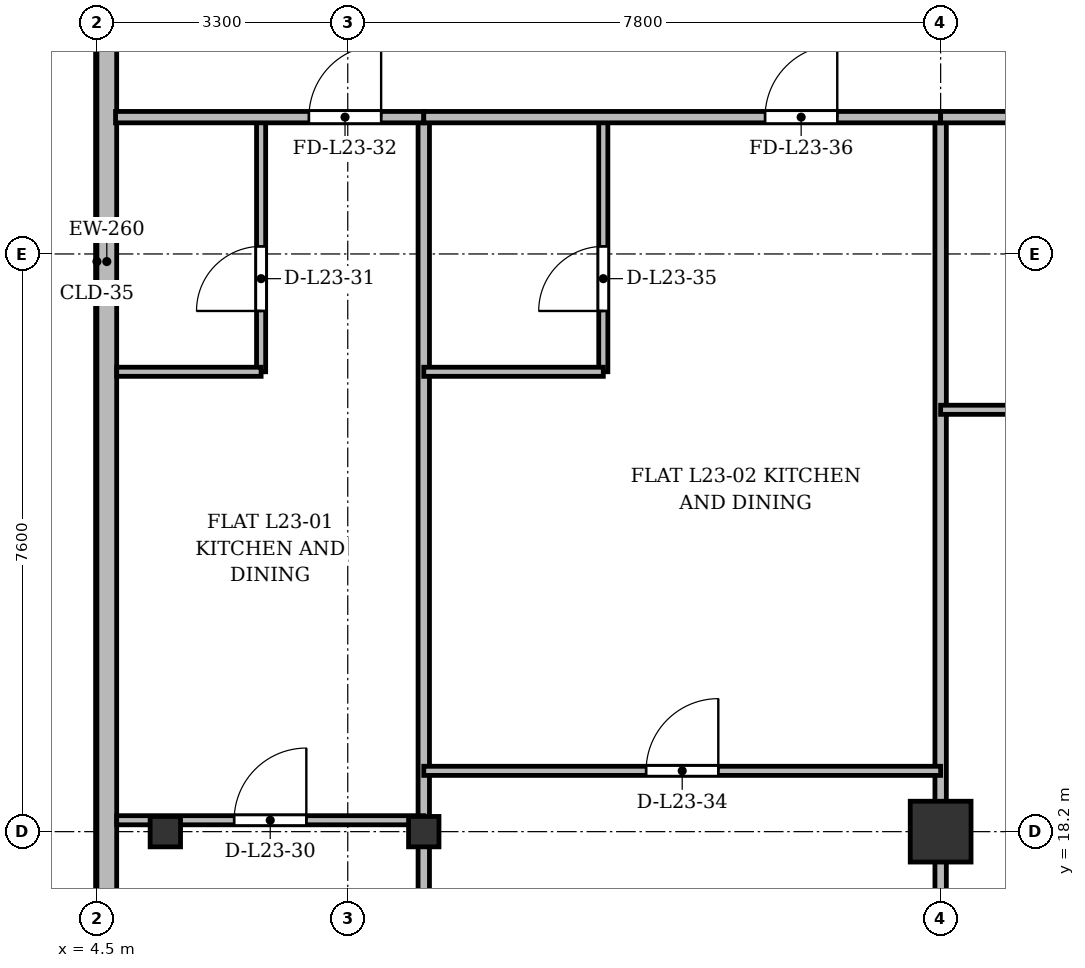
"""IFC4 building model, lengths in metres.
Left out: names, types, materials, properties, quantities, classifications, styles, units other than length and angle.
Written with IfcOpenShell. Run it as: python <this file> out.ifc"""

import sys

from ifc_helpers import new_model, si_unit, direction, frame, frame_2d, origin, origin_2d, place, context, subcontext, project, spatial, rectangle, i_section, extrude, source, transform, mapped, element, fill, save


model = new_model("IFC4")
c1 = context("Model", 3, precision=1e-05, world=origin(), true_north=direction((0.0, 1.0)))
c2 = subcontext(c1, "Body", "Model", "MODEL_VIEW")
j1 = project(units=[si_unit("LENGTHUNIT", "METRE"), si_unit("PLANEANGLEUNIT", "RADIAN")], contexts=[c1])
p1 = place(None, origin())
s1 = spatial("IfcSite", under=j1, at=p1, CompositionType="ELEMENT")
p2 = place(p1, origin())
s2 = spatial("IfcBuilding", under=s1, at=p2, CompositionType="ELEMENT")
p3 = place(p2, frame((0.0, 0.0, 92.5)))
s3 = spatial("IfcBuildingStorey", under=s2, at=p3, CompositionType="ELEMENT", Elevation=92.5)
m1 = source(origin(), c2, "Body", "SweptSolid", [
    extrude(i_section(OverallWidth=0.4, OverallDepth=0.4, WebThickness=0.022, FlangeThickness=0.035, at=origin_2d()), origin(), (0.0, 0.0, 1.0), 3.6),
])
for number, where, z_axis, x_axis in (
    (1, (5.4, 18.2, 0.0), (0.0, 0.0, 1.0), (1.0, 0.0, 0.0)),
    (2, (8.8, 18.2, 0.0), (0.0, 0.0, 1.0), (1.0, 0.0, 0.0)),
):
    element("IfcColumn", number, at=place(p3, frame(where, z_axis=z_axis, x_axis=x_axis)), inside=s3, PredefinedType="COLUMN", context=c2, shape_type="MappedRepresentation", body=[
        mapped(m1, transform((0.0, 0.0, 0.0), x_axis=(1.0, 0.0, 0.0), y_axis=(0.0, 1.0, 0.0), z_axis=(0.0, 0.0, 1.0), scale=1.0)),
    ])
m2 = source(origin(), c2, "Body", "SweptSolid", [
    extrude(rectangle(XDim=0.8, YDim=0.8, at=origin_2d()), origin(), (0.0, 0.0, 1.0), 3.6),
])
p4 = place(p3, frame((15.6, 18.2, 0.0), z_axis=(0.0, 0.0, 1.0), x_axis=(1.0, 0.0, 0.0)))
e3 = element("IfcColumn", 3, at=p4, inside=s3, PredefinedType="COLUMN", context=c2, shape_type="MappedRepresentation", body=[
    mapped(m2, transform((0.0, 0.0, 0.0), x_axis=(1.0, 0.0, 0.0), y_axis=(0.0, 1.0, 0.0), z_axis=(0.0, 0.0, 1.0), scale=1.0)),
])
p5 = place(p3, frame((4.63, 5.9, 0.0), z_axis=(0.0, 0.0, 1.0), x_axis=(0.0, 1.0, 0.0)))
e4 = element("IfcWall", 4, at=p5, inside=s3, PredefinedType="SOLIDWALL", context=c2, shape_type="SweptSolid", body=[
    extrude(rectangle(XDim=39.6, YDim=0.26, at=frame_2d((19.8, 0.0))), origin(), (0.0, 0.0, 1.0), 3.34),
])
p6 = place(p5, frame((1.45, 0.0, 0.92)))
e5 = element("IfcOpeningElement", 5, at=p6, cuts=e4, PredefinedType="OPENING", context=c2, shape_type="SweptSolid", body=[
    extrude(rectangle(XDim=1.2, YDim=1.65, at=frame_2d((0.6, 0.825))), frame((0.0, 0.14, 0.0), z_axis=(0.0, -1.0, 0.0), x_axis=(1.0, 0.0, 0.0)), (0.0, 0.0, 1.0), 0.28),
])
p7 = place(p5, frame((4.3, 0.0, 0.92)))
e6 = element("IfcOpeningElement", 6, at=p7, cuts=e4, PredefinedType="OPENING", context=c2, shape_type="SweptSolid", body=[
    extrude(rectangle(XDim=2.4, YDim=2.1, at=frame_2d((1.2, 1.05))), frame((0.0, 0.14, 0.0), z_axis=(0.0, -1.0, 0.0), x_axis=(1.0, 0.0, 0.0)), (0.0, 0.0, 1.0), 0.28),
])
p8 = place(p5, frame((8.5, 0.0, 0.92)))
e7 = element("IfcOpeningElement", 7, at=p8, cuts=e4, PredefinedType="OPENING", context=c2, shape_type="SweptSolid", body=[
    extrude(rectangle(XDim=2.4, YDim=2.1, at=frame_2d((1.2, 1.05))), frame((0.0, 0.14, 0.0), z_axis=(0.0, -1.0, 0.0), x_axis=(1.0, 0.0, 0.0)), (0.0, 0.0, 1.0), 0.28),
])
p9 = place(p5, frame((33.9, 0.0, 0.92)))
e8 = element("IfcOpeningElement", 8, at=p9, cuts=e4, PredefinedType="OPENING", context=c2, shape_type="SweptSolid", body=[
    extrude(rectangle(XDim=1.2, YDim=1.65, at=frame_2d((0.6, 0.825))), frame((0.0, 0.14, 0.0), z_axis=(0.0, -1.0, 0.0), x_axis=(1.0, 0.0, 0.0)), (0.0, 0.0, 1.0), 0.28),
])
p10 = place(p5, frame((37.25, 0.0, 0.92)))
e9 = element("IfcOpeningElement", 9, at=p10, cuts=e4, PredefinedType="OPENING", context=c2, shape_type="SweptSolid", body=[
    extrude(rectangle(XDim=1.2, YDim=1.65, at=frame_2d((0.6, 0.825))), frame((0.0, 0.14, 0.0), z_axis=(0.0, -1.0, 0.0), x_axis=(1.0, 0.0, 0.0)), (0.0, 0.0, 1.0), 0.28),
])
for number, where, z_axis, x_axis in (
    (10, (8.8, 3.145, 0.0), (0.0, 0.0, 1.0), (0.0, 1.0, 0.0)),
    (11, (15.6, 3.145, 0.0), (0.0, 0.0, 1.0), (0.0, 1.0, 0.0)),
):
    element("IfcWall", number, at=place(p3, frame(where, z_axis=z_axis, x_axis=x_axis)), inside=s3, PredefinedType="PARTITIONING", context=c2, shape_type="SweptSolid", body=[
        extrude(rectangle(XDim=24.455, YDim=0.15, at=frame_2d((12.228, 0.0))), origin(), (0.0, 0.0, 1.0), 2.84),
    ])
p11 = place(p3, frame((4.76, 18.35, 0.0), z_axis=(0.0, 0.0, 1.0), x_axis=(1.0, 0.0, 0.0)))
e12 = element("IfcWall", 12, at=p11, inside=s3, PredefinedType="PARTITIONING", context=c2, shape_type="SweptSolid", body=[
    extrude(rectangle(XDim=4.04, YDim=0.12, at=frame_2d((2.02, 0.0))), origin(), (0.0, 0.0, 1.0), 2.752),
])
p12 = place(p11, frame((1.545, 0.0, 0.0)))
e13 = element("IfcOpeningElement", 13, at=p12, cuts=e12, PredefinedType="OPENING", context=c2, shape_type="SweptSolid", body=[
    extrude(rectangle(XDim=0.95, YDim=2.15, at=frame_2d((0.475, 1.075))), frame((0.0, 0.07, 0.0), z_axis=(0.0, -1.0, 0.0), x_axis=(1.0, 0.0, 0.0)), (0.0, 0.0, 1.0), 0.14),
])
p13 = place(p3, frame((6.66, 24.25, 0.0), z_axis=(0.0, 0.0, 1.0), x_axis=(0.0, 1.0, 0.0)))
e14 = element("IfcWall", 14, at=p13, inside=s3, PredefinedType="PARTITIONING", context=c2, shape_type="SweptSolid", body=[
    extrude(rectangle(XDim=3.35, YDim=0.12, at=frame_2d((1.675, 0.0))), origin(), (0.0, 0.0, 1.0), 2.99),
])
p14 = place(p13, frame((0.8, 0.0, 0.0)))
e15 = element("IfcOpeningElement", 15, at=p14, cuts=e14, PredefinedType="OPENING", context=c2, shape_type="SweptSolid", body=[
    extrude(rectangle(XDim=0.85, YDim=2.1, at=frame_2d((0.425, 1.05))), frame((0.0, 0.07, 0.0), z_axis=(0.0, -1.0, 0.0), x_axis=(1.0, 0.0, 0.0)), (0.0, 0.0, 1.0), 0.14),
])
p15 = place(p3, frame((4.76, 24.25, 0.0), z_axis=(0.0, 0.0, 1.0), x_axis=(1.0, 0.0, 0.0)))
e16 = element("IfcWall", 16, at=p15, inside=s3, PredefinedType="PARTITIONING", context=c2, shape_type="SweptSolid", body=[
    extrude(rectangle(XDim=1.9, YDim=0.12, at=frame_2d((0.95, 0.0))), origin(), (0.0, 0.0, 1.0), 2.84),
])
p16 = place(p3, frame((4.745, 27.6, 0.0), z_axis=(0.0, 0.0, 1.0), x_axis=(1.0, 0.0, 0.0)))
e17 = element("IfcWall", 17, at=p16, inside=s3, PredefinedType="PARTITIONING", context=c2, shape_type="SweptSolid", body=[
    extrude(rectangle(XDim=4.055, YDim=0.15, at=frame_2d((2.027, 0.0))), origin(), (0.0, 0.0, 1.0), 2.84),
])
p17 = place(p16, frame((2.544, 0.0, 0.0)))
e18 = element("IfcOpeningElement", 18, at=p17, cuts=e17, PredefinedType="OPENING", context=c2, shape_type="SweptSolid", body=[
    extrude(rectangle(XDim=0.95, YDim=2.15, at=frame_2d((0.475, 1.075))), frame((0.0, 0.085, 0.0), z_axis=(0.0, -1.0, 0.0), x_axis=(1.0, 0.0, 0.0)), (0.0, 0.0, 1.0), 0.17),
])
p18 = place(p3, frame((8.8, 19.0, 0.0), z_axis=(0.0, 0.0, 1.0), x_axis=(1.0, 0.0, 0.0)))
e19 = element("IfcWall", 19, at=p18, inside=s3, PredefinedType="PARTITIONING", context=c2, shape_type="SweptSolid", body=[
    extrude(rectangle(XDim=6.8, YDim=0.12, at=frame_2d((3.4, 0.0))), origin(), (0.0, 0.0, 1.0), 2.84),
])
p19 = place(p18, frame((2.925, 0.0, 0.0)))
e20 = element("IfcOpeningElement", 20, at=p19, cuts=e19, PredefinedType="OPENING", context=c2, shape_type="SweptSolid", body=[
    extrude(rectangle(XDim=0.95, YDim=2.15, at=frame_2d((0.475, 1.075))), frame((0.0, 0.07, 0.0), z_axis=(0.0, -1.0, 0.0), x_axis=(1.0, 0.0, 0.0)), (0.0, 0.0, 1.0), 0.14),
])
p20 = place(p3, frame((11.162, 24.25, 0.0), z_axis=(0.0, 0.0, 1.0), x_axis=(0.0, 1.0, 0.0)))
e21 = element("IfcWall", 21, at=p20, inside=s3, PredefinedType="PARTITIONING", context=c2, shape_type="SweptSolid", body=[
    extrude(rectangle(XDim=3.35, YDim=0.12, at=frame_2d((1.675, 0.0))), origin(), (0.0, 0.0, 1.0), 2.99),
])
p21 = place(p20, frame((0.8, 0.0, 0.0)))
e22 = element("IfcOpeningElement", 22, at=p21, cuts=e21, PredefinedType="OPENING", context=c2, shape_type="SweptSolid", body=[
    extrude(rectangle(XDim=0.85, YDim=2.1, at=frame_2d((0.425, 1.05))), frame((0.0, 0.07, 0.0), z_axis=(0.0, -1.0, 0.0), x_axis=(1.0, 0.0, 0.0)), (0.0, 0.0, 1.0), 0.14),
])
p22 = place(p3, frame((8.8, 24.25, 0.0), z_axis=(0.0, 0.0, 1.0), x_axis=(1.0, 0.0, 0.0)))
e23 = element("IfcWall", 23, at=p22, inside=s3, PredefinedType="PARTITIONING", context=c2, shape_type="SweptSolid", body=[
    extrude(rectangle(XDim=2.362, YDim=0.12, at=frame_2d((1.181, 0.0))), origin(), (0.0, 0.0, 1.0), 2.84),
])
p23 = place(p3, frame((8.8, 27.6, 0.0), z_axis=(0.0, 0.0, 1.0), x_axis=(1.0, 0.0, 0.0)))
e24 = element("IfcWall", 24, at=p23, inside=s3, PredefinedType="PARTITIONING", context=c2, shape_type="SweptSolid", body=[
    extrude(rectangle(XDim=6.8, YDim=0.15, at=frame_2d((3.4, 0.0))), origin(), (0.0, 0.0, 1.0), 2.84),
])
p24 = place(p23, frame((4.49, 0.0, 0.0)))
e25 = element("IfcOpeningElement", 25, at=p24, cuts=e24, PredefinedType="OPENING", context=c2, shape_type="SweptSolid", body=[
    extrude(rectangle(XDim=0.95, YDim=2.15, at=frame_2d((0.475, 1.075))), frame((0.0, 0.085, 0.0), z_axis=(0.0, -1.0, 0.0), x_axis=(1.0, 0.0, 0.0)), (0.0, 0.0, 1.0), 0.17),
])
p25 = place(p3, frame((15.6, 27.6, 0.0), z_axis=(0.0, 0.0, 1.0), x_axis=(1.0, 0.0, 0.0)))
e26 = element("IfcWall", 26, at=p25, inside=s3, PredefinedType="PARTITIONING", context=c2, shape_type="SweptSolid", body=[
    extrude(rectangle(XDim=4.0, YDim=0.15, at=frame_2d((2.0, 0.0))), origin(), (0.0, 0.0, 1.0), 2.84),
])
p26 = place(p25, frame((1.525, 0.0, 0.0)))
e27 = element("IfcOpeningElement", 27, at=p26, cuts=e26, PredefinedType="OPENING", context=c2, shape_type="SweptSolid", body=[
    extrude(rectangle(XDim=0.95, YDim=2.15, at=frame_2d((0.475, 1.075))), frame((0.0, 0.085, 0.0), z_axis=(0.0, -1.0, 0.0), x_axis=(1.0, 0.0, 0.0)), (0.0, 0.0, 1.0), 0.17),
])
p27 = place(p3, frame((15.6, 23.75, 0.0), z_axis=(0.0, 0.0, 1.0), x_axis=(1.0, 0.0, 0.0)))
e28 = element("IfcWall", 28, at=p27, inside=s3, PredefinedType="PARTITIONING", context=c2, shape_type="SweptSolid", body=[
    extrude(rectangle(XDim=4.0, YDim=0.12, at=frame_2d((2.0, 0.0))), origin(), (0.0, 0.0, 1.0), 2.84),
])
p28 = place(p27, frame((1.525, 0.0, 0.0)))
e29 = element("IfcOpeningElement", 29, at=p28, cuts=e28, PredefinedType="OPENING", context=c2, shape_type="SweptSolid", body=[
    extrude(rectangle(XDim=0.95, YDim=2.15, at=frame_2d((0.475, 1.075))), frame((0.0, 0.07, 0.0), z_axis=(0.0, -1.0, 0.0), x_axis=(1.0, 0.0, 0.0)), (0.0, 0.0, 1.0), 0.14),
])
m3 = source(origin(), c2, "Body", "SweptSolid", [
    extrude(rectangle(XDim=0.95, YDim=2.15, at=frame_2d((0.475, 1.075))), frame((0.0, 0.025, 0.0), z_axis=(0.0, -1.0, 0.0), x_axis=(1.0, 0.0, 0.0)), (0.0, 0.0, 1.0), 0.05),
])
p29 = place(p12, origin())
e30 = element("IfcDoor", 30, at=p29, inside=s3, OperationType="SINGLE_SWING_RIGHT", PredefinedType="DOOR", context=c2, shape_type="MappedRepresentation", body=[
    mapped(m3, transform((0.0, 0.0, 0.0), x_axis=(1.0, 0.0, 0.0), y_axis=(0.0, 1.0, 0.0), z_axis=(0.0, 0.0, 1.0), scale=1.0)),
])
fill(e13, e30)
m4 = source(origin(), c2, "Body", "SweptSolid", [
    extrude(rectangle(XDim=0.85, YDim=2.1, at=frame_2d((0.425, 1.05))), frame((0.0, 0.025, 0.0), z_axis=(0.0, -1.0, 0.0), x_axis=(1.0, 0.0, 0.0)), (0.0, 0.0, 1.0), 0.05),
])
p30 = place(p14, origin())
e31 = element("IfcDoor", 31, at=p30, inside=s3, OperationType="SINGLE_SWING_LEFT", PredefinedType="DOOR", context=c2, shape_type="MappedRepresentation", body=[
    mapped(m4, transform((0.0, 0.0, 0.0), x_axis=(1.0, 0.0, 0.0), y_axis=(0.0, 1.0, 0.0), z_axis=(0.0, 0.0, 1.0), scale=1.0)),
])
fill(e15, e31)
p31 = place(p17, origin())
e32 = element("IfcDoor", 32, at=p31, inside=s3, OperationType="SINGLE_SWING_RIGHT", PredefinedType="DOOR", context=c2, shape_type="MappedRepresentation", body=[
    mapped(m3, transform((0.0, 0.0, 0.0), x_axis=(1.0, 0.0, 0.0), y_axis=(0.0, 1.0, 0.0), z_axis=(0.0, 0.0, 1.0), scale=1.0)),
])
fill(e18, e32)
p32 = place(p19, origin())
e33 = element("IfcDoor", 33, at=p32, inside=s3, OperationType="SINGLE_SWING_RIGHT", PredefinedType="DOOR", context=c2, shape_type="MappedRepresentation", body=[
    mapped(m3, transform((0.0, 0.0, 0.0), x_axis=(1.0, 0.0, 0.0), y_axis=(0.0, 1.0, 0.0), z_axis=(0.0, 0.0, 1.0), scale=1.0)),
])
fill(e20, e33)
p33 = place(p21, origin())
e34 = element("IfcDoor", 34, at=p33, inside=s3, OperationType="SINGLE_SWING_LEFT", PredefinedType="DOOR", context=c2, shape_type="MappedRepresentation", body=[
    mapped(m4, transform((0.0, 0.0, 0.0), x_axis=(1.0, 0.0, 0.0), y_axis=(0.0, 1.0, 0.0), z_axis=(0.0, 0.0, 1.0), scale=1.0)),
])
fill(e22, e34)
p34 = place(p24, origin())
e35 = element("IfcDoor", 35, at=p34, inside=s3, OperationType="SINGLE_SWING_RIGHT", PredefinedType="DOOR", context=c2, shape_type="MappedRepresentation", body=[
    mapped(m3, transform((0.0, 0.0, 0.0), x_axis=(1.0, 0.0, 0.0), y_axis=(0.0, 1.0, 0.0), z_axis=(0.0, 0.0, 1.0), scale=1.0)),
])
fill(e25, e35)
save(model, sys.argv[1])
